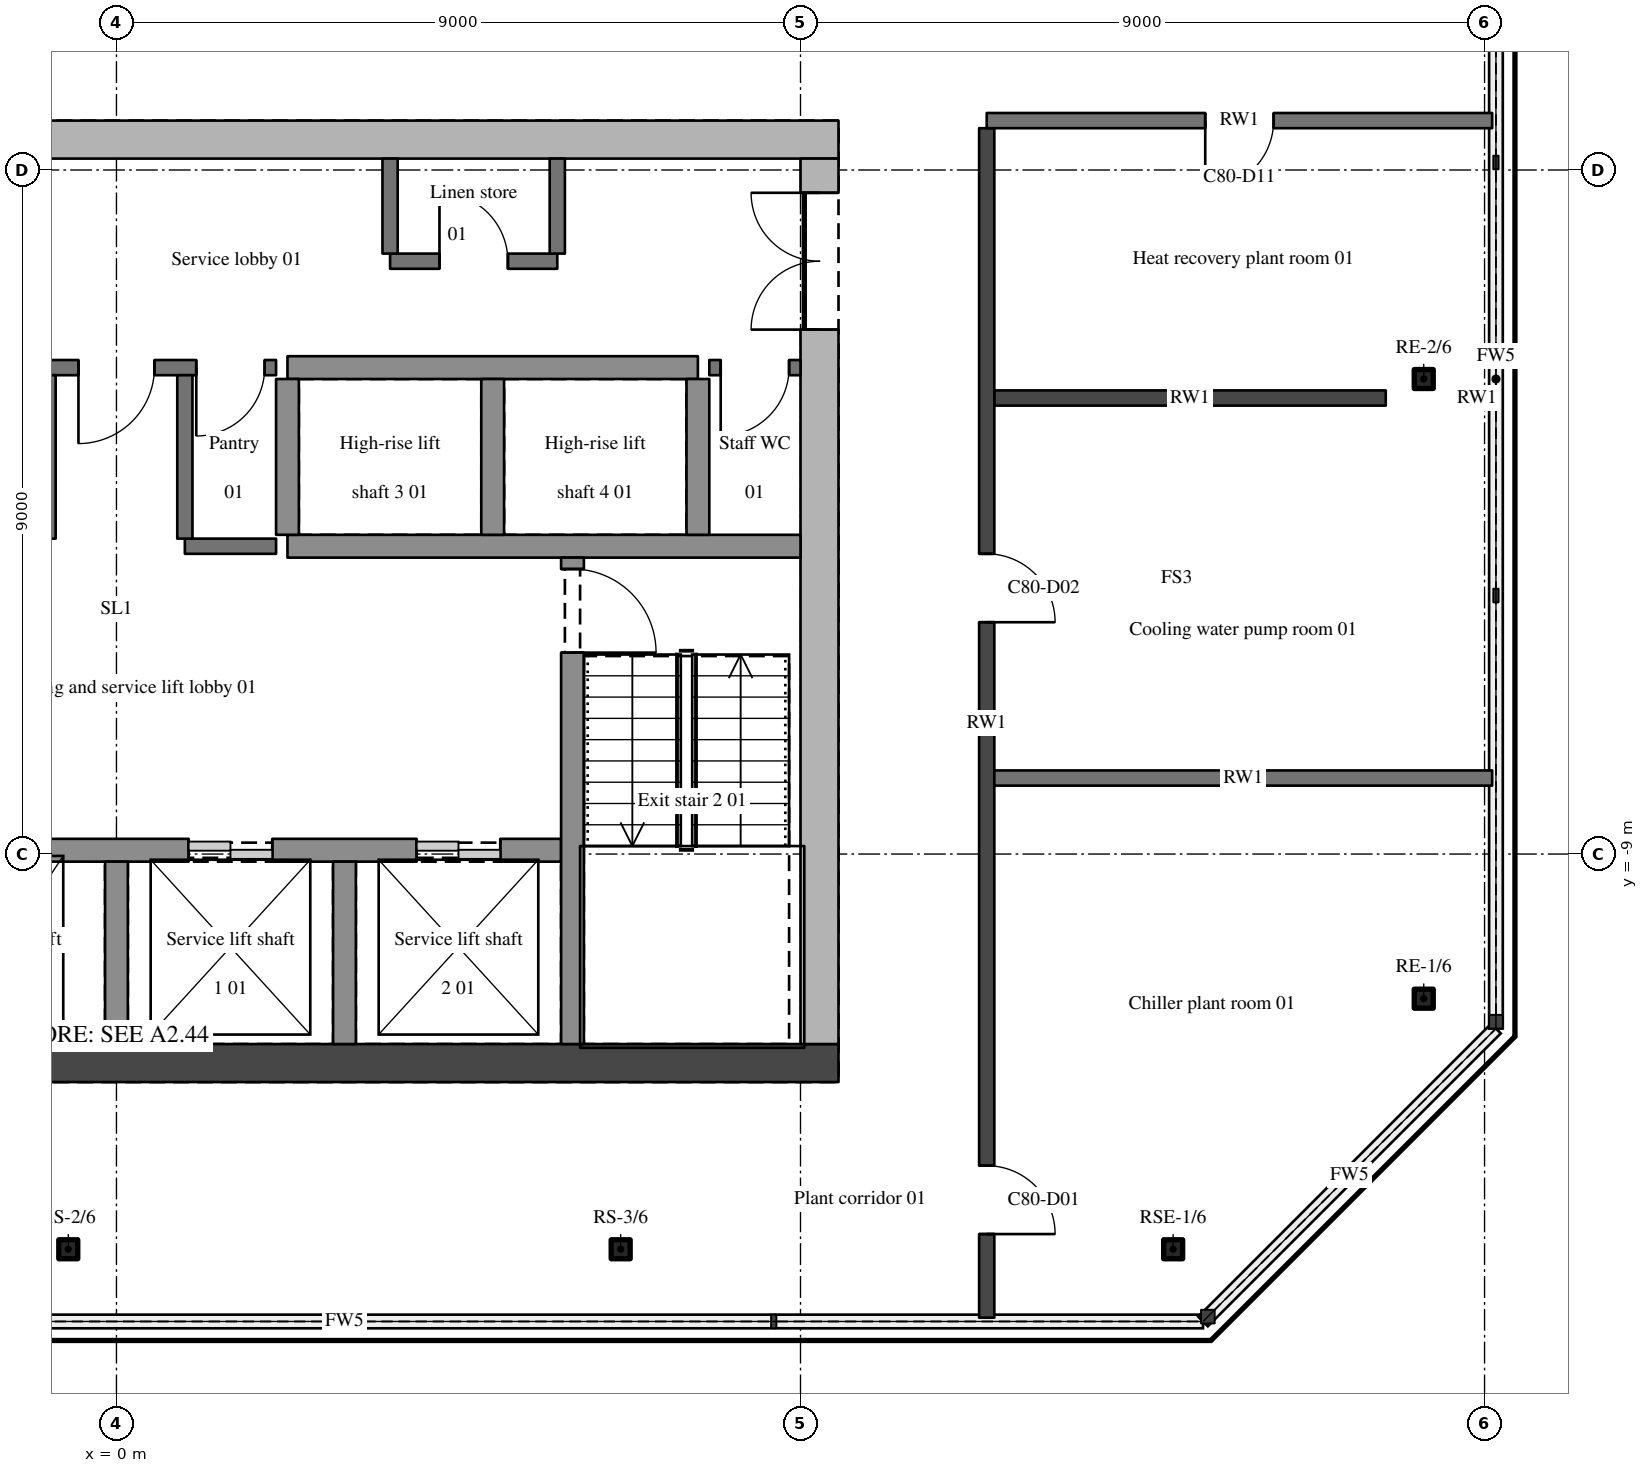
"""IFC4 building model, lengths in metres.
Left out: names, types, materials, properties, quantities, classifications, styles, units other than length and angle.
Written with IfcOpenShell. Run it as: python <this file> out.ifc"""

import sys

from ifc_helpers import new_model, si_unit, direction, frame, frame_2d, origin, origin_2d, place, context, subcontext, project, spatial, polyline, rectangle, hollow_rectangle, outline, extrude, element, fill, save


model = new_model("IFC4")
c1 = context("Model", 3, precision=1e-05, world=origin(), true_north=direction((0.0, 1.0)))
c2 = subcontext(c1, "Body", "Model", "MODEL_VIEW")
j1 = project(units=[si_unit("LENGTHUNIT", "METRE"), si_unit("PLANEANGLEUNIT", "RADIAN")], contexts=[c1])
p1 = place(None, origin())
s1 = spatial("IfcSite", under=j1, at=p1, CompositionType="ELEMENT")
p2 = place(p1, origin())
s2 = spatial("IfcBuilding", under=s1, at=p2, CompositionType="ELEMENT")
p3 = place(p2, frame((0.0, 0.0, 297.3)))
s3 = spatial("IfcBuildingStorey", under=s2, at=p3, CompositionType="ELEMENT", Elevation=297.3)
for number, where, z_axis, x_axis in (
    (1, (-0.634, -14.2, 0.0), (0.0, 0.0, 1.0), (1.0, 0.0, 0.0)),
    (2, (6.634, -14.2, 0.0), (0.0, 0.0, 1.0), (1.0, 0.0, 0.0)),
    (3, (13.903, -14.2, 0.0), (0.0, 0.0, 1.0), (1.0, 0.0, 0.0)),
    (4, (17.2, -10.903, 0.0), (0.0, 0.0, 1.0), (1.0, 0.0, 0.0)),
    (5, (17.2, -2.75, 0.0), (0.0, 0.0, 1.0), (1.0, 0.0, 0.0)),
):
    element("IfcColumn", number, at=place(p3, frame(where, z_axis=z_axis, x_axis=x_axis)), inside=s3, PredefinedType="COLUMN", context=c2, shape_type="SweptSolid", body=[
        extrude(hollow_rectangle(XDim=0.25, YDim=0.25, WallThickness=0.02, InnerFilletRadius=0.03, OuterFilletRadius=0.05, at=origin_2d()), origin(), (0.0, 0.0, 1.0), 3.6),
    ])
for number, where, z_axis, x_axis in (
    (6, (-9.5, -11.75, 0.0), (0.0, 0.0, 1.0), (1.0, 0.0, 0.0)),
    (7, (-9.5, 0.4, 0.0), (0.0, 0.0, 1.0), (1.0, 0.0, 0.0)),
):
    element("IfcWall", number, at=place(p3, frame(where, z_axis=z_axis, x_axis=x_axis)), inside=s3, PredefinedType="SHEAR", context=c2, shape_type="SweptSolid", body=[
        extrude(outline(polyline([(0.0, 0.0), (19.0, 0.0), (19.0, 3.6), (0.0, 3.6), (0.0, 0.0)])), frame((0.0, 0.25, 0.0), z_axis=(0.0, -1.0, 0.0), x_axis=(1.0, 0.0, 0.0)), (0.0, 0.0, 1.0), 0.5),
    ])
p4 = place(p3, frame((9.25, -11.5, 0.0), z_axis=(0.0, 0.0, 1.0), x_axis=(0.0, 1.0, 0.0)))
e8 = element("IfcWall", 8, at=p4, inside=s3, PredefinedType="SHEAR", context=c2, shape_type="SweptSolid", body=[
    extrude(outline(polyline([(0.0, 0.0), (11.65, 0.0), (11.65, 3.6), (0.0, 3.6), (0.0, 0.0)])), frame((0.0, 0.25, 0.0), z_axis=(0.0, -1.0, 0.0), x_axis=(1.0, 0.0, 0.0)), (0.0, 0.0, 1.0), 0.5),
])
p5 = place(p4, frame((9.4, 0.0, 0.0)))
e9 = element("IfcOpeningElement", 9, at=p5, cuts=e8, PredefinedType="OPENING", context=c2, shape_type="SweptSolid", body=[
    extrude(rectangle(XDim=1.8, YDim=2.1, at=frame_2d((0.9, 1.05))), frame((0.0, 0.26, 0.0), z_axis=(0.0, -1.0, 0.0), x_axis=(1.0, 0.0, 0.0)), (0.0, 0.0, 1.0), 0.52),
])
p6 = place(p3, frame((-5.85, -8.95, 0.0), z_axis=(0.0, 0.0, 1.0), x_axis=(1.0, 0.0, 0.0)))
e10 = element("IfcWall", 10, at=p6, inside=s3, PredefinedType="SHEAR", context=c2, shape_type="SweptSolid", body=[
    extrude(rectangle(XDim=11.7, YDim=0.3, at=frame_2d((5.85, 0.0))), origin(), (0.0, 0.0, 1.0), 3.6),
])
p7 = place(p6, frame((0.8, 0.0, 0.0)))
e11 = element("IfcOpeningElement", 11, at=p7, cuts=e10, PredefinedType="OPENING", context=c2, shape_type="SweptSolid", body=[
    extrude(rectangle(XDim=1.1, YDim=2.1, at=frame_2d((0.55, 1.05))), frame((0.0, 0.16, 0.0), z_axis=(0.0, -1.0, 0.0), x_axis=(1.0, 0.0, 0.0)), (0.0, 0.0, 1.0), 0.32),
])
p8 = place(p6, frame((3.8, 0.0, 0.0)))
e12 = element("IfcOpeningElement", 12, at=p8, cuts=e10, PredefinedType="OPENING", context=c2, shape_type="SweptSolid", body=[
    extrude(rectangle(XDim=1.1, YDim=2.1, at=frame_2d((0.55, 1.05))), frame((0.0, 0.16, 0.0), z_axis=(0.0, -1.0, 0.0), x_axis=(1.0, 0.0, 0.0)), (0.0, 0.0, 1.0), 0.32),
])
p9 = place(p6, frame((6.8, 0.0, 0.0)))
e13 = element("IfcOpeningElement", 13, at=p9, cuts=e10, PredefinedType="OPENING", context=c2, shape_type="SweptSolid", body=[
    extrude(rectangle(XDim=1.1, YDim=2.1, at=frame_2d((0.55, 1.05))), frame((0.0, 0.16, 0.0), z_axis=(0.0, -1.0, 0.0), x_axis=(1.0, 0.0, 0.0)), (0.0, 0.0, 1.0), 0.32),
])
p10 = place(p6, frame((9.8, 0.0, 0.0)))
e14 = element("IfcOpeningElement", 14, at=p10, cuts=e10, PredefinedType="OPENING", context=c2, shape_type="SweptSolid", body=[
    extrude(rectangle(XDim=1.1, YDim=2.1, at=frame_2d((0.55, 1.05))), frame((0.0, 0.16, 0.0), z_axis=(0.0, -1.0, 0.0), x_axis=(1.0, 0.0, 0.0)), (0.0, 0.0, 1.0), 0.32),
])
p11 = place(p3, frame((11.55, -8.0, 0.0), z_axis=(0.0, 0.0, 1.0), x_axis=(1.0, 0.0, 0.0)))
e15 = element("IfcWall", 15, at=p11, inside=s3, PredefinedType="SOLIDWALL", context=c2, shape_type="SweptSolid", body=[
    extrude(rectangle(XDim=6.55, YDim=0.2, at=frame_2d((3.275, 0.0))), origin(), (0.0, 0.0, 1.0), 2.66),
])
p12 = place(p3, frame((0.9, -4.95, 0.0), z_axis=(0.0, 0.0, 1.0), x_axis=(1.0, 0.0, 0.0)))
e16 = element("IfcWall", 16, at=p12, inside=s3, PredefinedType="SOLIDWALL", context=c2, shape_type="SweptSolid", body=[
    extrude(rectangle(XDim=1.2, YDim=0.2, at=frame_2d((0.6, 0.0))), origin(), (0.0, 0.0, 1.0), 3.3),
])
p13 = place(p3, frame((2.25, -4.95, 0.0), z_axis=(0.0, 0.0, 1.0), x_axis=(1.0, 0.0, 0.0)))
e17 = element("IfcWall", 17, at=p13, inside=s3, PredefinedType="SHEAR", context=c2, shape_type="SweptSolid", body=[
    extrude(rectangle(XDim=6.75, YDim=0.3, at=frame_2d((3.375, 0.0))), origin(), (0.0, 0.0, 1.0), 3.6),
])
p14 = place(p3, frame((11.55, -3.0, 0.0), z_axis=(0.0, 0.0, 1.0), x_axis=(1.0, 0.0, 0.0)))
e18 = element("IfcWall", 18, at=p14, inside=s3, PredefinedType="SOLIDWALL", context=c2, shape_type="SweptSolid", body=[
    extrude(rectangle(XDim=5.15, YDim=0.2, at=frame_2d((2.575, 0.0))), origin(), (0.0, 0.0, 1.0), 2.46),
])
p15 = place(p3, frame((17.7, -3.0, 0.0), z_axis=(0.0, 0.0, 1.0), x_axis=(1.0, 0.0, 0.0)))
e19 = element("IfcWall", 19, at=p15, inside=s3, PredefinedType="SOLIDWALL", context=c2, shape_type="SweptSolid", body=[
    extrude(rectangle(XDim=0.4, YDim=0.2, at=frame_2d((0.2, 0.0))), origin(), (0.0, 0.0, 1.0), 2.66),
])
p16 = place(p3, frame((2.1, -2.6, 0.0), z_axis=(0.0, 0.0, 1.0), x_axis=(-1.0, 0.0, 0.0)))
e20 = element("IfcWall", 20, at=p16, inside=s3, PredefinedType="SOLIDWALL", context=c2, shape_type="SweptSolid", body=[
    extrude(rectangle(XDim=4.2, YDim=0.2, at=frame_2d((2.1, 0.0))), origin(), (0.0, 0.0, 1.0), 3.3),
])
p17 = place(p16, frame((1.6, 0.0, 0.0)))
e21 = element("IfcOpeningElement", 21, at=p17, cuts=e20, PredefinedType="OPENING", context=c2, shape_type="SweptSolid", body=[
    extrude(rectangle(XDim=1.0, YDim=2.1, at=frame_2d((0.5, 1.05))), frame((0.0, 0.11, 0.0), z_axis=(0.0, -1.0, 0.0), x_axis=(1.0, 0.0, 0.0)), (0.0, 0.0, 1.0), 0.22),
])
p18 = place(p16, frame((3.15, 0.0, 0.0)))
e22 = element("IfcOpeningElement", 22, at=p18, cuts=e20, PredefinedType="OPENING", context=c2, shape_type="SweptSolid", body=[
    extrude(rectangle(XDim=0.9, YDim=2.1, at=frame_2d((0.45, 1.05))), frame((0.0, 0.11, 0.0), z_axis=(0.0, -1.0, 0.0), x_axis=(1.0, 0.0, 0.0)), (0.0, 0.0, 1.0), 0.22),
])
p19 = place(p16, frame((0.15, 0.0, 0.0)))
e23 = element("IfcOpeningElement", 23, at=p19, cuts=e20, PredefinedType="OPENING", context=c2, shape_type="SweptSolid", body=[
    extrude(rectangle(XDim=0.9, YDim=2.1, at=frame_2d((0.45, 1.05))), frame((0.0, 0.11, 0.0), z_axis=(0.0, -1.0, 0.0), x_axis=(1.0, 0.0, 0.0)), (0.0, 0.0, 1.0), 0.22),
])
p20 = place(p3, frame((2.25, -2.6, 0.0), z_axis=(0.0, 0.0, 1.0), x_axis=(1.0, 0.0, 0.0)))
e24 = element("IfcWall", 24, at=p20, inside=s3, PredefinedType="SHEAR", context=c2, shape_type="SweptSolid", body=[
    extrude(rectangle(XDim=5.4, YDim=0.3, at=frame_2d((2.7, 0.0))), origin(), (0.0, 0.0, 1.0), 3.6),
])
p21 = place(p3, frame((9.0, -2.6, 0.0), z_axis=(0.0, 0.0, 1.0), x_axis=(-1.0, 0.0, 0.0)))
e25 = element("IfcWall", 25, at=p21, inside=s3, PredefinedType="SOLIDWALL", context=c2, shape_type="SweptSolid", body=[
    extrude(rectangle(XDim=1.2, YDim=0.2, at=frame_2d((0.6, 0.0))), origin(), (0.0, 0.0, 1.0), 3.3),
])
p22 = place(p21, frame((0.15, 0.0, 0.0)))
e26 = element("IfcOpeningElement", 26, at=p22, cuts=e25, PredefinedType="OPENING", context=c2, shape_type="SweptSolid", body=[
    extrude(rectangle(XDim=0.9, YDim=2.1, at=frame_2d((0.45, 1.05))), frame((0.0, 0.11, 0.0), z_axis=(0.0, -1.0, 0.0), x_axis=(1.0, 0.0, 0.0)), (0.0, 0.0, 1.0), 0.22),
])
p23 = place(p3, frame((3.6, -1.2, 0.0), z_axis=(0.0, 0.0, 1.0), x_axis=(1.0, 0.0, 0.0)))
e27 = element("IfcWall", 27, at=p23, inside=s3, PredefinedType="SOLIDWALL", context=c2, shape_type="SweptSolid", body=[
    extrude(rectangle(XDim=2.2, YDim=0.2, at=frame_2d((1.1, 0.0))), origin(), (0.0, 0.0, 1.0), 3.3),
])
p24 = place(p23, frame((0.65, 0.0, 0.0)))
e28 = element("IfcOpeningElement", 28, at=p24, cuts=e27, PredefinedType="OPENING", context=c2, shape_type="SweptSolid", body=[
    extrude(rectangle(XDim=0.9, YDim=2.1, at=frame_2d((0.45, 1.05))), frame((0.0, 0.11, 0.0), z_axis=(0.0, -1.0, 0.0), x_axis=(1.0, 0.0, 0.0)), (0.0, 0.0, 1.0), 0.22),
])
p25 = place(p3, frame((18.1, 0.65, 0.0), z_axis=(0.0, 0.0, 1.0), x_axis=(-1.0, 0.0, 0.0)))
e29 = element("IfcWall", 29, at=p25, inside=s3, PredefinedType="SOLIDWALL", context=c2, shape_type="SweptSolid", body=[
    extrude(rectangle(XDim=6.65, YDim=0.2, at=frame_2d((3.325, 0.0))), origin(), (0.0, 0.0, 1.0), 2.66),
])
p26 = place(p25, frame((2.875, 0.0, 0.0)))
e30 = element("IfcOpeningElement", 30, at=p26, cuts=e29, PredefinedType="OPENING", context=c2, shape_type="SweptSolid", body=[
    extrude(rectangle(XDim=0.9, YDim=2.1, at=frame_2d((0.45, 1.05))), frame((0.0, 0.11, 0.0), z_axis=(0.0, -1.0, 0.0), x_axis=(1.0, 0.0, 0.0)), (0.0, 0.0, 1.0), 0.22),
])
p27 = place(p3, frame((-0.9, -4.85, 0.0), z_axis=(0.0, 0.0, 1.0), x_axis=(0.0, 1.0, 0.0)))
e31 = element("IfcWall", 31, at=p27, inside=s3, PredefinedType="SOLIDWALL", context=c2, shape_type="SweptSolid", body=[
    extrude(rectangle(XDim=2.15, YDim=0.2, at=frame_2d((1.075, 0.0))), origin(), (0.0, 0.0, 1.0), 3.3),
])
p28 = place(p3, frame((0.0, -11.5, 0.0), z_axis=(0.0, 0.0, 1.0), x_axis=(0.0, 1.0, 0.0)))
e32 = element("IfcWall", 32, at=p28, inside=s3, PredefinedType="SHEAR", context=c2, shape_type="SweptSolid", body=[
    extrude(rectangle(XDim=2.4, YDim=0.3, at=frame_2d((1.2, 0.0))), origin(), (0.0, 0.0, 1.0), 3.6),
])
p29 = place(p3, frame((0.9, -4.85, 0.0), z_axis=(0.0, 0.0, 1.0), x_axis=(0.0, 1.0, 0.0)))
e33 = element("IfcWall", 33, at=p29, inside=s3, PredefinedType="SOLIDWALL", context=c2, shape_type="SweptSolid", body=[
    extrude(rectangle(XDim=2.15, YDim=0.2, at=frame_2d((1.075, 0.0))), origin(), (0.0, 0.0, 1.0), 3.3),
])
p30 = place(p3, frame((2.25, -4.8, 0.0), z_axis=(0.0, 0.0, 1.0), x_axis=(0.0, 1.0, 0.0)))
e34 = element("IfcWall", 34, at=p30, inside=s3, PredefinedType="SHEAR", context=c2, shape_type="SweptSolid", body=[
    extrude(rectangle(XDim=2.05, YDim=0.3, at=frame_2d((1.025, 0.0))), origin(), (0.0, 0.0, 1.0), 3.6),
])
p31 = place(p3, frame((3.0, -11.5, 0.0), z_axis=(0.0, 0.0, 1.0), x_axis=(0.0, 1.0, 0.0)))
e35 = element("IfcWall", 35, at=p31, inside=s3, PredefinedType="SHEAR", context=c2, shape_type="SweptSolid", body=[
    extrude(rectangle(XDim=2.4, YDim=0.3, at=frame_2d((1.2, 0.0))), origin(), (0.0, 0.0, 1.0), 3.6),
])
p32 = place(p3, frame((3.6, -1.1, 0.0), z_axis=(0.0, 0.0, 1.0), x_axis=(0.0, 1.0, 0.0)))
e36 = element("IfcWall", 36, at=p32, inside=s3, PredefinedType="SOLIDWALL", context=c2, shape_type="SweptSolid", body=[
    extrude(rectangle(XDim=1.25, YDim=0.2, at=frame_2d((0.625, 0.0))), origin(), (0.0, 0.0, 1.0), 3.3),
])
p33 = place(p3, frame((4.95, -4.8, 0.0), z_axis=(0.0, 0.0, 1.0), x_axis=(0.0, 1.0, 0.0)))
e37 = element("IfcWall", 37, at=p33, inside=s3, PredefinedType="SHEAR", context=c2, shape_type="SweptSolid", body=[
    extrude(rectangle(XDim=2.05, YDim=0.3, at=frame_2d((1.025, 0.0))), origin(), (0.0, 0.0, 1.0), 3.6),
])
p34 = place(p3, frame((5.8, -1.1, 0.0), z_axis=(0.0, 0.0, 1.0), x_axis=(0.0, 1.0, 0.0)))
e38 = element("IfcWall", 38, at=p34, inside=s3, PredefinedType="SOLIDWALL", context=c2, shape_type="SweptSolid", body=[
    extrude(rectangle(XDim=1.25, YDim=0.2, at=frame_2d((0.625, 0.0))), origin(), (0.0, 0.0, 1.0), 3.3),
])
p35 = place(p3, frame((6.0, -5.1, 0.0), z_axis=(0.0, 0.0, 1.0), x_axis=(0.0, -1.0, 0.0)))
e39 = element("IfcWall", 39, at=p35, inside=s3, PredefinedType="SHEAR", context=c2, shape_type="SweptSolid", body=[
    extrude(rectangle(XDim=6.4, YDim=0.3, at=frame_2d((3.2, 0.0))), origin(), (0.0, 0.0, 1.0), 3.6),
])
p36 = place(p35, frame((0.15, 0.0, 0.0)))
e40 = element("IfcOpeningElement", 40, at=p36, cuts=e39, PredefinedType="OPENING", context=c2, shape_type="SweptSolid", body=[
    extrude(rectangle(XDim=1.1, YDim=2.1, at=frame_2d((0.55, 1.05))), frame((0.0, 0.16, 0.0), z_axis=(0.0, -1.0, 0.0), x_axis=(1.0, 0.0, 0.0)), (0.0, 0.0, 1.0), 0.32),
])
p37 = place(p3, frame((7.65, -4.8, 0.0), z_axis=(0.0, 0.0, 1.0), x_axis=(0.0, 1.0, 0.0)))
e41 = element("IfcWall", 41, at=p37, inside=s3, PredefinedType="SHEAR", context=c2, shape_type="SweptSolid", body=[
    extrude(rectangle(XDim=2.05, YDim=0.3, at=frame_2d((1.025, 0.0))), origin(), (0.0, 0.0, 1.0), 3.6),
])
p38 = place(p3, frame((11.45, 0.55, 0.0), z_axis=(0.0, 0.0, 1.0), x_axis=(0.0, -1.0, 0.0)))
e42 = element("IfcWall", 42, at=p38, inside=s3, PredefinedType="SOLIDWALL", context=c2, shape_type="SweptSolid", body=[
    extrude(rectangle(XDim=15.65, YDim=0.2, at=frame_2d((7.825, 0.0))), origin(), (0.0, 0.0, 1.0), 2.46),
])
p39 = place(p38, frame((13.65, 0.0, 0.0)))
e43 = element("IfcOpeningElement", 43, at=p39, cuts=e42, PredefinedType="OPENING", context=c2, shape_type="SweptSolid", body=[
    extrude(rectangle(XDim=0.9, YDim=2.1, at=frame_2d((0.45, 1.05))), frame((0.0, 0.11, 0.0), z_axis=(0.0, -1.0, 0.0), x_axis=(1.0, 0.0, 0.0)), (0.0, 0.0, 1.0), 0.22),
])
p40 = place(p38, frame((5.6, 0.0, 0.0)))
e44 = element("IfcOpeningElement", 44, at=p40, cuts=e42, PredefinedType="OPENING", context=c2, shape_type="SweptSolid", body=[
    extrude(rectangle(XDim=0.9, YDim=2.1, at=frame_2d((0.45, 1.05))), frame((0.0, 0.11, 0.0), z_axis=(0.0, -1.0, 0.0), x_axis=(1.0, 0.0, 0.0)), (0.0, 0.0, 1.0), 0.22),
])
p41 = place(p5, origin())
e45 = element("IfcDoor", 45, at=p41, inside=s3, OperationType="DOUBLE_DOOR_SINGLE_SWING", PredefinedType="DOOR", context=c2, shape_type="SweptSolid", body=[
    extrude(rectangle(XDim=1.8, YDim=2.1, at=frame_2d((0.9, 1.05))), frame((0.0, 0.025, 0.0), z_axis=(0.0, -1.0, 0.0), x_axis=(1.0, 0.0, 0.0)), (0.0, 0.0, 1.0), 0.05),
])
fill(e9, e45)
p42 = place(p17, origin())
e46 = element("IfcDoor", 46, at=p42, inside=s3, OperationType="SINGLE_SWING_RIGHT", PredefinedType="DOOR", context=c2, shape_type="SweptSolid", body=[
    extrude(rectangle(XDim=1.0, YDim=2.1, at=frame_2d((0.5, 1.05))), frame((0.0, 0.025, 0.0), z_axis=(0.0, -1.0, 0.0), x_axis=(1.0, 0.0, 0.0)), (0.0, 0.0, 1.0), 0.05),
])
fill(e21, e46)
p43 = place(p36, origin())
e47 = element("IfcDoor", 47, at=p43, inside=s3, OperationType="SINGLE_SWING_RIGHT", PredefinedType="DOOR", context=c2, shape_type="SweptSolid", body=[
    extrude(rectangle(XDim=1.1, YDim=2.1, at=frame_2d((0.55, 1.05))), frame((0.0, 0.025, 0.0), z_axis=(0.0, -1.0, 0.0), x_axis=(1.0, 0.0, 0.0)), (0.0, 0.0, 1.0), 0.05),
])
fill(e40, e47)
p44 = place(p19, origin())
e48 = element("IfcDoor", 48, at=p44, inside=s3, OperationType="SINGLE_SWING_RIGHT", PredefinedType="DOOR", context=c2, shape_type="SweptSolid", body=[
    extrude(rectangle(XDim=0.9, YDim=2.1, at=frame_2d((0.45, 1.05))), frame((0.0, 0.025, 0.0), z_axis=(0.0, -1.0, 0.0), x_axis=(1.0, 0.0, 0.0)), (0.0, 0.0, 1.0), 0.05),
])
fill(e23, e48)
p45 = place(p22, origin())
e49 = element("IfcDoor", 49, at=p45, inside=s3, OperationType="SINGLE_SWING_RIGHT", PredefinedType="DOOR", context=c2, shape_type="SweptSolid", body=[
    extrude(rectangle(XDim=0.9, YDim=2.1, at=frame_2d((0.45, 1.05))), frame((0.0, 0.025, 0.0), z_axis=(0.0, -1.0, 0.0), x_axis=(1.0, 0.0, 0.0)), (0.0, 0.0, 1.0), 0.05),
])
fill(e26, e49)
p46 = place(p39, origin())
e50 = element("IfcDoor", 50, at=p46, inside=s3, OperationType="SINGLE_SWING_RIGHT", PredefinedType="DOOR", context=c2, shape_type="SweptSolid", body=[
    extrude(rectangle(XDim=0.9, YDim=2.1, at=frame_2d((0.45, 1.05))), frame((0.0, 0.025, 0.0), z_axis=(0.0, -1.0, 0.0), x_axis=(1.0, 0.0, 0.0)), (0.0, 0.0, 1.0), 0.05),
])
fill(e43, e50)
p47 = place(p40, origin())
e51 = element("IfcDoor", 51, at=p47, inside=s3, OperationType="SINGLE_SWING_RIGHT", PredefinedType="DOOR", context=c2, shape_type="SweptSolid", body=[
    extrude(rectangle(XDim=0.9, YDim=2.1, at=frame_2d((0.45, 1.05))), frame((0.0, 0.025, 0.0), z_axis=(0.0, -1.0, 0.0), x_axis=(1.0, 0.0, 0.0)), (0.0, 0.0, 1.0), 0.05),
])
fill(e44, e51)
p48 = place(p26, origin())
e52 = element("IfcDoor", 52, at=p48, inside=s3, OperationType="SINGLE_SWING_RIGHT", PredefinedType="DOOR", context=c2, shape_type="SweptSolid", body=[
    extrude(rectangle(XDim=0.9, YDim=2.1, at=frame_2d((0.45, 1.05))), frame((0.0, 0.025, 0.0), z_axis=(0.0, -1.0, 0.0), x_axis=(1.0, 0.0, 0.0)), (0.0, 0.0, 1.0), 0.05),
])
fill(e30, e52)
p49 = place(p24, origin())
e53 = element("IfcDoor", 53, at=p49, inside=s3, OperationType="SINGLE_SWING_LEFT", PredefinedType="DOOR", context=c2, shape_type="SweptSolid", body=[
    extrude(rectangle(XDim=0.9, YDim=2.1, at=frame_2d((0.45, 1.05))), frame((0.0, 0.025, 0.0), z_axis=(0.0, -1.0, 0.0), x_axis=(1.0, 0.0, 0.0)), (0.0, 0.0, 1.0), 0.05),
])
fill(e28, e53)
p50 = place(p9, origin())
e54 = element("IfcDoor", 54, at=p50, inside=s3, OperationType="DOUBLE_DOOR_SLIDING", PredefinedType="DOOR", context=c2, shape_type="SweptSolid", body=[
    extrude(rectangle(XDim=1.1, YDim=2.1, at=frame_2d((0.55, 1.05))), frame((0.0, 0.025, 0.0), z_axis=(0.0, -1.0, 0.0), x_axis=(1.0, 0.0, 0.0)), (0.0, 0.0, 1.0), 0.05),
])
fill(e13, e54)
p51 = place(p10, origin())
e55 = element("IfcDoor", 55, at=p51, inside=s3, OperationType="DOUBLE_DOOR_SLIDING", PredefinedType="DOOR", context=c2, shape_type="SweptSolid", body=[
    extrude(rectangle(XDim=1.1, YDim=2.1, at=frame_2d((0.55, 1.05))), frame((0.0, 0.025, 0.0), z_axis=(0.0, -1.0, 0.0), x_axis=(1.0, 0.0, 0.0)), (0.0, 0.0, 1.0), 0.05),
])
fill(e14, e55)
save(model, sys.argv[1])
